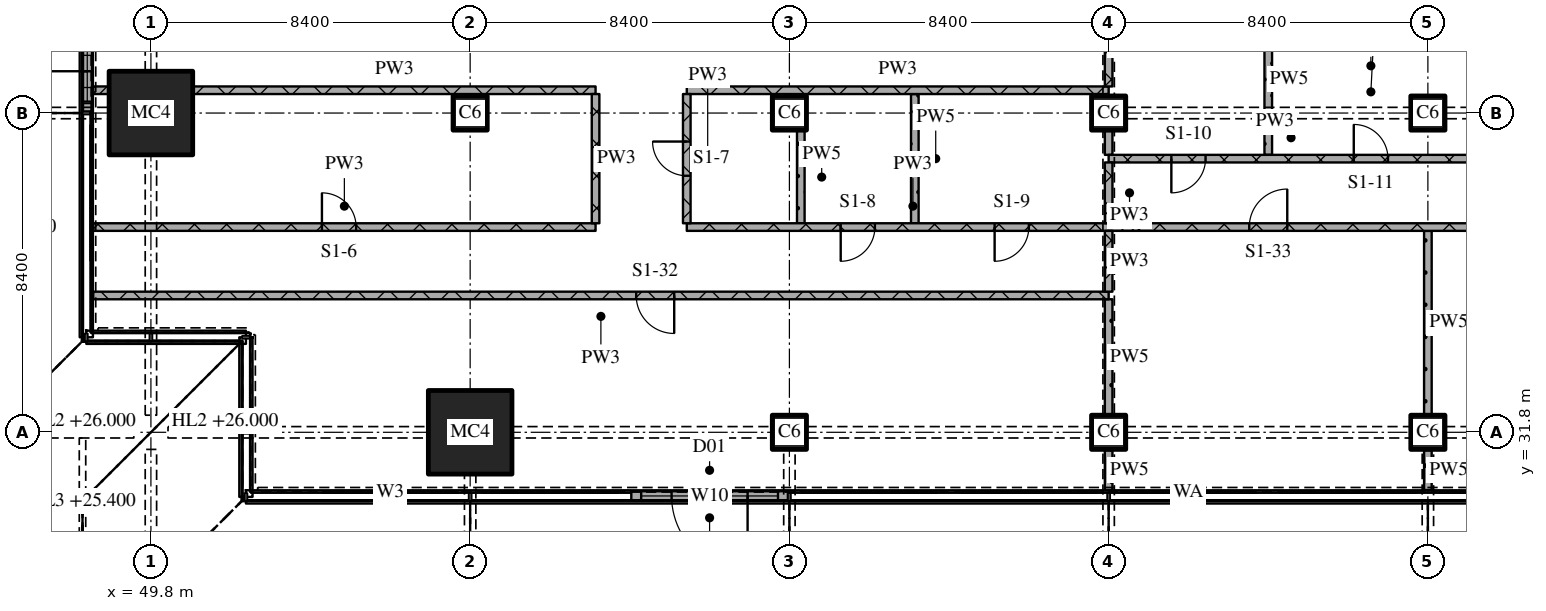
"""IFC4 building model, lengths in metres.
Left out: names, types, materials, properties, quantities, classifications, styles, units other than length and angle.
Written with IfcOpenShell. Run it as: python <this file> out.ifc"""

import sys

from ifc_helpers import new_model, si_unit, direction, frame, frame_2d, origin, origin_2d, place, context, subcontext, project, spatial, rectangle, extrude, element, fill, save


model = new_model("IFC4")
c1 = context("Model", 3, precision=1e-05, world=origin(), true_north=direction((0.0, 1.0)))
c2 = subcontext(c1, "Body", "Model", "MODEL_VIEW")
j1 = project(units=[si_unit("LENGTHUNIT", "METRE"), si_unit("PLANEANGLEUNIT", "RADIAN")], contexts=[c1])
p1 = place(None, origin())
s1 = spatial("IfcSite", under=j1, at=p1, CompositionType="ELEMENT")
p2 = place(p1, origin())
s2 = spatial("IfcBuilding", under=s1, at=p2, CompositionType="ELEMENT")
p3 = place(p2, frame((0.0, 0.0, 19.2)))
s3 = spatial("IfcBuildingStorey", under=s2, at=p3, CompositionType="ELEMENT", Elevation=19.2)
for number, where, z_axis, x_axis in (
    (1, (49.8, 40.2, 0.0), (0.0, 0.0, 1.0), (1.0, 0.0, 0.0)),
    (2, (58.2, 31.8, 0.0), (0.0, 0.0, 1.0), (1.0, 0.0, 0.0)),
):
    element("IfcColumn", number, at=place(p3, frame(where, z_axis=z_axis, x_axis=x_axis)), inside=s3, PredefinedType="COLUMN", context=c2, shape_type="SweptSolid", body=[
        extrude(rectangle(XDim=2.2, YDim=2.2, at=origin_2d()), origin(), (0.0, 0.0, 1.0), 4.5),
    ])
for number, where, z_axis, x_axis in (
    (3, (58.2, 40.2, 0.0), (0.0, 0.0, 1.0), (1.0, 0.0, 0.0)),
    (4, (66.6, 31.8, 0.0), (0.0, 0.0, 1.0), (1.0, 0.0, 0.0)),
    (5, (66.6, 40.2, 0.0), (0.0, 0.0, 1.0), (1.0, 0.0, 0.0)),
    (6, (75.0, 31.8, 0.0), (0.0, 0.0, 1.0), (1.0, 0.0, 0.0)),
    (7, (75.0, 40.2, 0.0), (0.0, 0.0, 1.0), (1.0, 0.0, 0.0)),
    (8, (83.4, 31.8, 0.0), (0.0, 0.0, 1.0), (1.0, 0.0, 0.0)),
    (9, (83.4, 40.2, 0.0), (0.0, 0.0, 1.0), (1.0, 0.0, 0.0)),
):
    element("IfcColumn", number, at=place(p3, frame(where, z_axis=z_axis, x_axis=x_axis)), inside=s3, PredefinedType="COLUMN", context=c2, shape_type="SweptSolid", body=[
        extrude(rectangle(XDim=0.9, YDim=0.9, at=origin_2d()), origin(), (0.0, 0.0, 1.0), 4.5),
    ])
p4 = place(p3, frame((66.56, 30.125, 0.0), z_axis=(0.0, 0.0, 1.0), x_axis=(-1.0, 0.0, 0.0)))
e10 = element("IfcWall", 10, at=p4, inside=s3, PredefinedType="SOLIDWALL", context=c2, shape_type="SweptSolid", body=[
    extrude(rectangle(XDim=4.12, YDim=0.25, at=frame_2d((2.06, 0.0))), origin(), (0.0, 0.0, 1.0), 4.2),
])
p5 = place(p4, frame((1.06, 0.0, 0.0)))
e11 = element("IfcOpeningElement", 11, at=p5, cuts=e10, PredefinedType="OPENING", context=c2, shape_type="SweptSolid", body=[
    extrude(rectangle(XDim=2.0, YDim=2.4, at=frame_2d((1.0, 1.2))), frame((0.0, 0.135, 0.0), z_axis=(0.0, -1.0, 0.0), x_axis=(1.0, 0.0, 0.0)), (0.0, 0.0, 1.0), 0.27),
])
p6 = place(p4, frame((0.26, 0.0, 2.7)))
e12 = element("IfcOpeningElement", 12, at=p6, cuts=e10, PredefinedType="OPENING", context=c2, shape_type="SweptSolid", body=[
    extrude(rectangle(XDim=3.6, YDim=1.1, at=frame_2d((1.8, 0.55))), frame((0.0, 0.135, 0.0), z_axis=(0.0, -1.0, 0.0), x_axis=(1.0, 0.0, 0.0)), (0.0, 0.0, 1.0), 0.27),
])
p7 = place(p3, frame((48.125, 40.24, 0.0), z_axis=(0.0, 0.0, 1.0), x_axis=(0.0, 1.0, 0.0)))
e13 = element("IfcWall", 13, at=p7, inside=s3, PredefinedType="SOLIDWALL", context=c2, shape_type="SweptSolid", body=[
    extrude(rectangle(XDim=4.12, YDim=0.25, at=frame_2d((2.06, 0.0))), origin(), (0.0, 0.0, 1.0), 4.2),
])
p8 = place(p7, frame((1.06, 0.0, 0.0)))
e14 = element("IfcOpeningElement", 14, at=p8, cuts=e13, PredefinedType="OPENING", context=c2, shape_type="SweptSolid", body=[
    extrude(rectangle(XDim=2.0, YDim=2.4, at=frame_2d((1.0, 1.2))), frame((0.0, 0.135, 0.0), z_axis=(0.0, -1.0, 0.0), x_axis=(1.0, 0.0, 0.0)), (0.0, 0.0, 1.0), 0.27),
])
p9 = place(p7, frame((0.26, 0.0, 2.7)))
e15 = element("IfcOpeningElement", 15, at=p9, cuts=e13, PredefinedType="OPENING", context=c2, shape_type="SweptSolid", body=[
    extrude(rectangle(XDim=3.6, YDim=1.1, at=frame_2d((1.8, 0.55))), frame((0.0, 0.135, 0.0), z_axis=(0.0, -1.0, 0.0), x_axis=(1.0, 0.0, 0.0)), (0.0, 0.0, 1.0), 0.27),
])
p10 = place(p3, frame((75.0, 35.4, 0.0), z_axis=(0.0, 0.0, 1.0), x_axis=(-1.0, 0.0, 0.0)))
e16 = element("IfcWall", 16, at=p10, inside=s3, PredefinedType="PARTITIONING", context=c2, shape_type="SweptSolid", body=[
    extrude(rectangle(XDim=26.72, YDim=0.2, at=frame_2d((13.36, 0.0))), origin(), (0.0, 0.0, 1.0), 4.2),
])
p11 = place(p10, frame((11.431, 0.0, 0.0)))
e17 = element("IfcOpeningElement", 17, at=p11, cuts=e16, PredefinedType="OPENING", context=c2, shape_type="SweptSolid", body=[
    extrude(rectangle(XDim=1.0, YDim=2.1, at=frame_2d((0.5, 1.05))), frame((0.0, 0.11, 0.0), z_axis=(0.0, -1.0, 0.0), x_axis=(1.0, 0.0, 0.0)), (0.0, 0.0, 1.0), 0.22),
])
p12 = place(p3, frame((48.28, 37.2, 0.0), z_axis=(0.0, 0.0, 1.0), x_axis=(1.0, 0.0, 0.0)))
e18 = element("IfcWall", 18, at=p12, inside=s3, PredefinedType="PARTITIONING", context=c2, shape_type="SweptSolid", body=[
    extrude(rectangle(XDim=13.22, YDim=0.2, at=frame_2d((6.61, 0.0))), origin(), (0.0, 0.0, 1.0), 4.2),
])
p13 = place(p12, frame((6.02, 0.0, 0.0)))
e19 = element("IfcOpeningElement", 19, at=p13, cuts=e18, PredefinedType="OPENING", context=c2, shape_type="SweptSolid", body=[
    extrude(rectangle(XDim=0.9, YDim=2.1, at=frame_2d((0.45, 1.05))), frame((0.0, 0.11, 0.0), z_axis=(0.0, -1.0, 0.0), x_axis=(1.0, 0.0, 0.0)), (0.0, 0.0, 1.0), 0.22),
])
p14 = place(p3, frame((63.9, 37.2, 0.0), z_axis=(0.0, 0.0, 1.0), x_axis=(1.0, 0.0, 0.0)))
e20 = element("IfcWall", 20, at=p14, inside=s3, PredefinedType="PARTITIONING", context=c2, shape_type="SweptSolid", body=[
    extrude(rectangle(XDim=11.9, YDim=0.2, at=frame_2d((5.95, 0.0))), origin(), (0.0, 0.0, 1.0), 4.2),
])
p15 = place(p14, frame((4.05, 0.0, 0.0)))
e21 = element("IfcOpeningElement", 21, at=p15, cuts=e20, PredefinedType="OPENING", context=c2, shape_type="SweptSolid", body=[
    extrude(rectangle(XDim=0.9, YDim=2.1, at=frame_2d((0.45, 1.05))), frame((0.0, 0.11, 0.0), z_axis=(0.0, -1.0, 0.0), x_axis=(1.0, 0.0, 0.0)), (0.0, 0.0, 1.0), 0.22),
])
p16 = place(p14, frame((8.1, 0.0, 0.0)))
e22 = element("IfcOpeningElement", 22, at=p16, cuts=e20, PredefinedType="OPENING", context=c2, shape_type="SweptSolid", body=[
    extrude(rectangle(XDim=0.9, YDim=2.1, at=frame_2d((0.45, 1.05))), frame((0.0, 0.11, 0.0), z_axis=(0.0, -1.0, 0.0), x_axis=(1.0, 0.0, 0.0)), (0.0, 0.0, 1.0), 0.22),
])
p17 = place(p3, frame((99.175, 37.2, 0.0), z_axis=(0.0, 0.0, 1.0), x_axis=(-1.0, 0.0, 0.0)))
e23 = element("IfcWall", 23, at=p17, inside=s3, PredefinedType="PARTITIONING", context=c2, shape_type="SweptSolid", body=[
    extrude(rectangle(XDim=23.375, YDim=0.2, at=frame_2d((11.688, 0.0))), origin(), (0.0, 0.0, 1.0), 4.2),
])
p18 = place(p17, frame((2.675, 0.0, 0.0)))
e24 = element("IfcOpeningElement", 24, at=p18, cuts=e23, PredefinedType="OPENING", context=c2, shape_type="SweptSolid", body=[
    extrude(rectangle(XDim=1.0, YDim=2.1, at=frame_2d((0.5, 1.05))), frame((0.0, 0.11, 0.0), z_axis=(0.0, -1.0, 0.0), x_axis=(1.0, 0.0, 0.0)), (0.0, 0.0, 1.0), 0.22),
])
p19 = place(p17, frame((11.075, 0.0, 0.0)))
e25 = element("IfcOpeningElement", 25, at=p19, cuts=e23, PredefinedType="OPENING", context=c2, shape_type="SweptSolid", body=[
    extrude(rectangle(XDim=1.0, YDim=2.1, at=frame_2d((0.5, 1.05))), frame((0.0, 0.11, 0.0), z_axis=(0.0, -1.0, 0.0), x_axis=(1.0, 0.0, 0.0)), (0.0, 0.0, 1.0), 0.22),
])
p20 = place(p17, frame((19.475, 0.0, 0.0)))
e26 = element("IfcOpeningElement", 26, at=p20, cuts=e23, PredefinedType="OPENING", context=c2, shape_type="SweptSolid", body=[
    extrude(rectangle(XDim=1.0, YDim=2.1, at=frame_2d((0.5, 1.05))), frame((0.0, 0.11, 0.0), z_axis=(0.0, -1.0, 0.0), x_axis=(1.0, 0.0, 0.0)), (0.0, 0.0, 1.0), 0.22),
])
p21 = place(p3, frame((75.0, 39.0, 0.0), z_axis=(0.0, 0.0, 1.0), x_axis=(1.0, 0.0, 0.0)))
e27 = element("IfcWall", 27, at=p21, inside=s3, PredefinedType="PARTITIONING", context=c2, shape_type="SweptSolid", body=[
    extrude(rectangle(XDim=9.6, YDim=0.2, at=frame_2d((4.8, 0.0))), origin(), (0.0, 0.0, 1.0), 4.2),
])
p22 = place(p21, frame((1.65, 0.0, 0.0)))
e28 = element("IfcOpeningElement", 28, at=p22, cuts=e27, PredefinedType="OPENING", context=c2, shape_type="SweptSolid", body=[
    extrude(rectangle(XDim=0.9, YDim=2.1, at=frame_2d((0.45, 1.05))), frame((0.0, 0.11, 0.0), z_axis=(0.0, -1.0, 0.0), x_axis=(1.0, 0.0, 0.0)), (0.0, 0.0, 1.0), 0.22),
])
p23 = place(p21, frame((6.45, 0.0, 0.0)))
e29 = element("IfcOpeningElement", 29, at=p23, cuts=e27, PredefinedType="OPENING", context=c2, shape_type="SweptSolid", body=[
    extrude(rectangle(XDim=0.9, YDim=2.1, at=frame_2d((0.45, 1.05))), frame((0.0, 0.11, 0.0), z_axis=(0.0, -1.0, 0.0), x_axis=(1.0, 0.0, 0.0)), (0.0, 0.0, 1.0), 0.22),
])
p24 = place(p3, frame((48.28, 40.8, 0.0), z_axis=(0.0, 0.0, 1.0), x_axis=(1.0, 0.0, 0.0)))
e30 = element("IfcWall", 30, at=p24, inside=s3, PredefinedType="PARTITIONING", context=c2, shape_type="SweptSolid", body=[
    extrude(rectangle(XDim=0.4, YDim=0.2, at=frame_2d((0.2, 0.0))), origin(), (0.0, 0.0, 1.0), 4.2),
])
p25 = place(p3, frame((50.92, 40.8, 0.0), z_axis=(0.0, 0.0, 1.0), x_axis=(1.0, 0.0, 0.0)))
e31 = element("IfcWall", 31, at=p25, inside=s3, PredefinedType="PARTITIONING", context=c2, shape_type="SweptSolid", body=[
    extrude(rectangle(XDim=10.58, YDim=0.2, at=frame_2d((5.29, 0.0))), origin(), (0.0, 0.0, 1.0), 4.2),
])
p26 = place(p3, frame((63.9, 40.8, 0.0), z_axis=(0.0, 0.0, 1.0), x_axis=(1.0, 0.0, 0.0)))
e32 = element("IfcWall", 32, at=p26, inside=s3, PredefinedType="PARTITIONING", context=c2, shape_type="SweptSolid", body=[
    extrude(rectangle(XDim=11.1, YDim=0.2, at=frame_2d((5.55, 0.0))), origin(), (0.0, 0.0, 1.0), 4.2),
])
p27 = place(p3, frame((61.5, 40.7, 0.0), z_axis=(0.0, 0.0, 1.0), x_axis=(0.0, -1.0, 0.0)))
e33 = element("IfcWall", 33, at=p27, inside=s3, PredefinedType="PARTITIONING", context=c2, shape_type="SweptSolid", body=[
    extrude(rectangle(XDim=3.4, YDim=0.2, at=frame_2d((1.7, 0.0))), origin(), (0.0, 0.0, 1.0), 4.2),
])
p28 = place(p3, frame((63.9, 40.7, 0.0), z_axis=(0.0, 0.0, 1.0), x_axis=(0.0, -1.0, 0.0)))
e34 = element("IfcWall", 34, at=p28, inside=s3, PredefinedType="PARTITIONING", context=c2, shape_type="SweptSolid", body=[
    extrude(rectangle(XDim=3.4, YDim=0.2, at=frame_2d((1.7, 0.0))), origin(), (0.0, 0.0, 1.0), 4.2),
])
p29 = place(p28, frame((1.25, 0.0, 0.0)))
e35 = element("IfcOpeningElement", 35, at=p29, cuts=e34, PredefinedType="OPENING", context=c2, shape_type="SweptSolid", body=[
    extrude(rectangle(XDim=0.9, YDim=2.1, at=frame_2d((0.45, 1.05))), frame((0.0, 0.11, 0.0), z_axis=(0.0, -1.0, 0.0), x_axis=(1.0, 0.0, 0.0)), (0.0, 0.0, 1.0), 0.22),
])
p30 = place(p3, frame((66.9, 39.73, 0.0), z_axis=(0.0, 0.0, 1.0), x_axis=(0.0, -1.0, 0.0)))
e36 = element("IfcWall", 36, at=p30, inside=s3, PredefinedType="PARTITIONING", context=c2, shape_type="SweptSolid", body=[
    extrude(rectangle(XDim=2.43, YDim=0.2, at=frame_2d((1.215, 0.0))), origin(), (0.0, 0.0, 1.0), 4.2),
])
p31 = place(p3, frame((69.9, 40.7, 0.0), z_axis=(0.0, 0.0, 1.0), x_axis=(0.0, -1.0, 0.0)))
e37 = element("IfcWall", 37, at=p31, inside=s3, PredefinedType="PARTITIONING", context=c2, shape_type="SweptSolid", body=[
    extrude(rectangle(XDim=3.4, YDim=0.2, at=frame_2d((1.7, 0.0))), origin(), (0.0, 0.0, 1.0), 4.2),
])
p32 = place(p3, frame((75.0, 43.1, 0.0), z_axis=(0.0, 0.0, 1.0), x_axis=(0.0, -1.0, 0.0)))
e38 = element("IfcWall", 38, at=p32, inside=s3, PredefinedType="PARTITIONING", context=c2, shape_type="SweptSolid", body=[
    extrude(rectangle(XDim=2.2, YDim=0.2, at=frame_2d((1.1, 0.0))), origin(), (0.0, 0.0, 1.0), 3.3),
])
p33 = place(p3, frame((75.0, 31.33, 0.0), z_axis=(0.0, 0.0, 1.0), x_axis=(0.0, -1.0, 0.0)))
e39 = element("IfcWall", 39, at=p33, inside=s3, PredefinedType="PARTITIONING", context=c2, shape_type="SweptSolid", body=[
    extrude(rectangle(XDim=1.05, YDim=0.2, at=frame_2d((0.525, 0.0))), origin(), (0.0, 0.0, 1.0), 4.2),
])
p34 = place(p3, frame((75.0, 35.3, 0.0), z_axis=(0.0, 0.0, 1.0), x_axis=(0.0, -1.0, 0.0)))
e40 = element("IfcWall", 40, at=p34, inside=s3, PredefinedType="PARTITIONING", context=c2, shape_type="SweptSolid", body=[
    extrude(rectangle(XDim=3.03, YDim=0.2, at=frame_2d((1.515, 0.0))), origin(), (0.0, 0.0, 1.0), 3.7),
])
p35 = place(p3, frame((75.0, 39.73, 0.0), z_axis=(0.0, 0.0, 1.0), x_axis=(0.0, -1.0, 0.0)))
e41 = element("IfcWall", 41, at=p35, inside=s3, PredefinedType="PARTITIONING", context=c2, shape_type="SweptSolid", body=[
    extrude(rectangle(XDim=0.63, YDim=0.2, at=frame_2d((0.315, 0.0))), origin(), (0.0, 0.0, 1.0), 3.7),
])
p36 = place(p3, frame((79.2, 43.1, 0.0), z_axis=(0.0, 0.0, 1.0), x_axis=(0.0, -1.0, 0.0)))
e42 = element("IfcWall", 42, at=p36, inside=s3, PredefinedType="PARTITIONING", context=c2, shape_type="SweptSolid", body=[
    extrude(rectangle(XDim=4.0, YDim=0.2, at=frame_2d((2.0, 0.0))), origin(), (0.0, 0.0, 1.0), 4.2),
])
p37 = place(p3, frame((83.4, 31.33, 0.0), z_axis=(0.0, 0.0, 1.0), x_axis=(0.0, -1.0, 0.0)))
e43 = element("IfcWall", 43, at=p37, inside=s3, PredefinedType="PARTITIONING", context=c2, shape_type="SweptSolid", body=[
    extrude(rectangle(XDim=1.05, YDim=0.2, at=frame_2d((0.525, 0.0))), origin(), (0.0, 0.0, 1.0), 4.2),
])
p38 = place(p3, frame((83.4, 37.1, 0.0), z_axis=(0.0, 0.0, 1.0), x_axis=(0.0, -1.0, 0.0)))
e44 = element("IfcWall", 44, at=p38, inside=s3, PredefinedType="PARTITIONING", context=c2, shape_type="SweptSolid", body=[
    extrude(rectangle(XDim=4.83, YDim=0.2, at=frame_2d((2.415, 0.0))), origin(), (0.0, 0.0, 1.0), 4.2),
])
p39 = place(p3, frame((75.0, 37.1, 0.0), z_axis=(0.0, 0.0, 1.0), x_axis=(0.0, -1.0, 0.0)))
e45 = element("IfcWall", 45, at=p39, inside=s3, PredefinedType="PARTITIONING", context=c2, shape_type="SweptSolid", body=[
    extrude(rectangle(XDim=1.6, YDim=0.2, at=frame_2d((0.8, 0.0))), origin(), (0.0, 0.0, 1.0), 3.7),
])
p40 = place(p3, frame((75.0, 38.9, 0.0), z_axis=(0.0, 0.0, 1.0), x_axis=(0.0, -1.0, 0.0)))
e46 = element("IfcWall", 46, at=p40, inside=s3, PredefinedType="PARTITIONING", context=c2, shape_type="SweptSolid", body=[
    extrude(rectangle(XDim=1.6, YDim=0.2, at=frame_2d((0.8, 0.0))), origin(), (0.0, 0.0, 1.0), 3.7),
])
p41 = place(p5, origin())
e47 = element("IfcDoor", 47, at=p41, inside=s3, OperationType="DOUBLE_DOOR_SINGLE_SWING", PredefinedType="DOOR", context=c2, shape_type="SweptSolid", body=[
    extrude(rectangle(XDim=2.0, YDim=2.4, at=frame_2d((1.0, 1.2))), frame((0.0, 0.025, 0.0), z_axis=(0.0, -1.0, 0.0), x_axis=(1.0, 0.0, 0.0)), (0.0, 0.0, 1.0), 0.05),
])
fill(e11, e47)
p42 = place(p6, origin())
e48 = element("IfcWindow", 48, at=p42, inside=s3, PartitioningType="SINGLE_PANEL", PredefinedType="WINDOW", context=c2, shape_type="SweptSolid", body=[
    extrude(rectangle(XDim=3.6, YDim=1.1, at=frame_2d((1.8, 0.55))), frame((0.0, 0.03, 0.0), z_axis=(0.0, -1.0, 0.0), x_axis=(1.0, 0.0, 0.0)), (0.0, 0.0, 1.0), 0.06),
])
fill(e12, e48)
p43 = place(p8, origin())
e49 = element("IfcDoor", 49, at=p43, inside=s3, OperationType="DOUBLE_DOOR_SINGLE_SWING", PredefinedType="DOOR", context=c2, shape_type="SweptSolid", body=[
    extrude(rectangle(XDim=2.0, YDim=2.4, at=frame_2d((1.0, 1.2))), frame((0.0, 0.025, 0.0), z_axis=(0.0, -1.0, 0.0), x_axis=(1.0, 0.0, 0.0)), (0.0, 0.0, 1.0), 0.05),
])
fill(e14, e49)
p44 = place(p9, origin())
e50 = element("IfcWindow", 50, at=p44, inside=s3, PartitioningType="SINGLE_PANEL", PredefinedType="WINDOW", context=c2, shape_type="SweptSolid", body=[
    extrude(rectangle(XDim=3.6, YDim=1.1, at=frame_2d((1.8, 0.55))), frame((0.0, 0.03, 0.0), z_axis=(0.0, -1.0, 0.0), x_axis=(1.0, 0.0, 0.0)), (0.0, 0.0, 1.0), 0.06),
])
fill(e15, e50)
p45 = place(p11, origin())
e51 = element("IfcDoor", 51, at=p45, inside=s3, OperationType="SINGLE_SWING_LEFT", PredefinedType="DOOR", context=c2, shape_type="SweptSolid", body=[
    extrude(rectangle(XDim=1.0, YDim=2.1, at=frame_2d((0.5, 1.05))), frame((0.0, 0.025, 0.0), z_axis=(0.0, -1.0, 0.0), x_axis=(1.0, 0.0, 0.0)), (0.0, 0.0, 1.0), 0.05),
])
fill(e17, e51)
p46 = place(p13, origin())
e52 = element("IfcDoor", 52, at=p46, inside=s3, OperationType="SINGLE_SWING_LEFT", PredefinedType="DOOR", context=c2, shape_type="SweptSolid", body=[
    extrude(rectangle(XDim=0.9, YDim=2.1, at=frame_2d((0.45, 1.05))), frame((0.0, 0.025, 0.0), z_axis=(0.0, -1.0, 0.0), x_axis=(1.0, 0.0, 0.0)), (0.0, 0.0, 1.0), 0.05),
])
fill(e19, e52)
p47 = place(p15, origin())
e53 = element("IfcDoor", 53, at=p47, inside=s3, OperationType="SINGLE_SWING_RIGHT", PredefinedType="DOOR", context=c2, shape_type="SweptSolid", body=[
    extrude(rectangle(XDim=0.9, YDim=2.1, at=frame_2d((0.45, 1.05))), frame((0.0, 0.025, 0.0), z_axis=(0.0, -1.0, 0.0), x_axis=(1.0, 0.0, 0.0)), (0.0, 0.0, 1.0), 0.05),
])
fill(e21, e53)
p48 = place(p16, origin())
e54 = element("IfcDoor", 54, at=p48, inside=s3, OperationType="SINGLE_SWING_RIGHT", PredefinedType="DOOR", context=c2, shape_type="SweptSolid", body=[
    extrude(rectangle(XDim=0.9, YDim=2.1, at=frame_2d((0.45, 1.05))), frame((0.0, 0.025, 0.0), z_axis=(0.0, -1.0, 0.0), x_axis=(1.0, 0.0, 0.0)), (0.0, 0.0, 1.0), 0.05),
])
fill(e22, e54)
p49 = place(p20, origin())
e55 = element("IfcDoor", 55, at=p49, inside=s3, OperationType="SINGLE_SWING_RIGHT", PredefinedType="DOOR", context=c2, shape_type="SweptSolid", body=[
    extrude(rectangle(XDim=1.0, YDim=2.1, at=frame_2d((0.5, 1.05))), frame((0.0, 0.025, 0.0), z_axis=(0.0, -1.0, 0.0), x_axis=(1.0, 0.0, 0.0)), (0.0, 0.0, 1.0), 0.05),
])
fill(e26, e55)
p50 = place(p22, origin())
e56 = element("IfcDoor", 56, at=p50, inside=s3, OperationType="SINGLE_SWING_RIGHT", PredefinedType="DOOR", context=c2, shape_type="SweptSolid", body=[
    extrude(rectangle(XDim=0.9, YDim=2.1, at=frame_2d((0.45, 1.05))), frame((0.0, 0.025, 0.0), z_axis=(0.0, -1.0, 0.0), x_axis=(1.0, 0.0, 0.0)), (0.0, 0.0, 1.0), 0.05),
])
fill(e28, e56)
p51 = place(p23, origin())
e57 = element("IfcDoor", 57, at=p51, inside=s3, OperationType="SINGLE_SWING_LEFT", PredefinedType="DOOR", context=c2, shape_type="SweptSolid", body=[
    extrude(rectangle(XDim=0.9, YDim=2.1, at=frame_2d((0.45, 1.05))), frame((0.0, 0.025, 0.0), z_axis=(0.0, -1.0, 0.0), x_axis=(1.0, 0.0, 0.0)), (0.0, 0.0, 1.0), 0.05),
])
fill(e29, e57)
p52 = place(p29, origin())
e58 = element("IfcDoor", 58, at=p52, inside=s3, OperationType="SINGLE_SWING_RIGHT", PredefinedType="DOOR", context=c2, shape_type="SweptSolid", body=[
    extrude(rectangle(XDim=0.9, YDim=2.1, at=frame_2d((0.45, 1.05))), frame((0.0, 0.025, 0.0), z_axis=(0.0, -1.0, 0.0), x_axis=(1.0, 0.0, 0.0)), (0.0, 0.0, 1.0), 0.05),
])
fill(e35, e58)
save(model, sys.argv[1])
